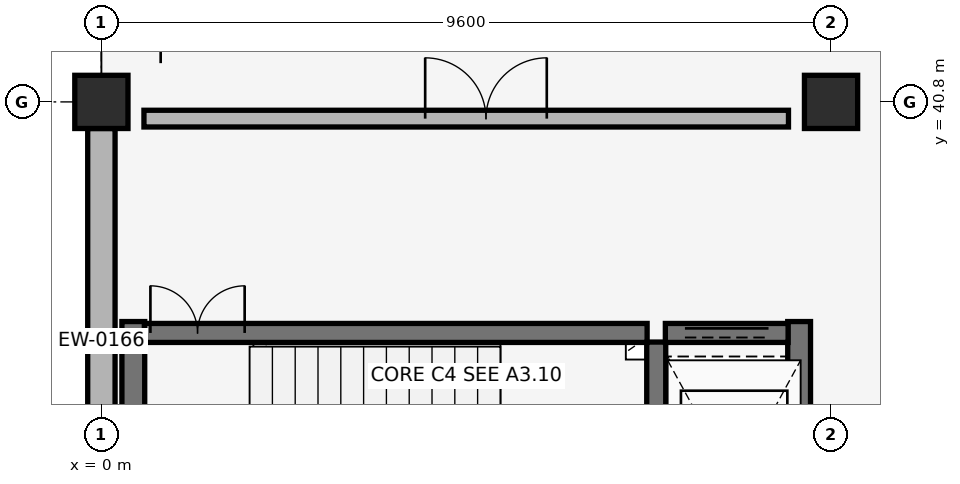
"""IFC4 building model, lengths in metres.
Left out: names, types, materials, properties, quantities, classifications, styles, units other than length and angle.
Written with IfcOpenShell. Run it as: python <this file> out.ifc"""

import sys

from ifc_helpers import new_model, si_unit, direction, frame, frame_2d, origin, origin_2d, place, context, subcontext, project, spatial, rectangle, circle, extrude, element, fill, save


model = new_model("IFC4")
c1 = context("Model", 3, precision=1e-05, world=origin(), true_north=direction((0.0, 1.0)))
c2 = subcontext(c1, "Body", "Model", "MODEL_VIEW")
j1 = project(units=[si_unit("LENGTHUNIT", "METRE"), si_unit("PLANEANGLEUNIT", "RADIAN")], contexts=[c1])
p1 = place(None, origin())
s1 = spatial("IfcSite", under=j1, at=p1, CompositionType="ELEMENT")
p2 = place(p1, origin())
s2 = spatial("IfcBuilding", under=s1, at=p2, CompositionType="ELEMENT")
p3 = place(p2, frame((0.0, 0.0, 4.42)))
s3 = spatial("IfcBuildingStorey", under=s2, at=p3, CompositionType="ELEMENT", Elevation=4.42)
for number, where, z_axis, x_axis in (
    (1, (0.0, 40.8, 0.0), (0.0, 0.0, 1.0), (1.0, 0.0, 0.0)),
    (2, (9.6, 40.8, 0.0), (0.0, 0.0, 1.0), (1.0, 0.0, 0.0)),
):
    element("IfcColumn", number, at=place(p3, frame(where, z_axis=z_axis, x_axis=x_axis)), inside=s3, PredefinedType="COLUMN", context=c2, shape_type="SweptSolid", body=[
        extrude(circle(Radius=0.35, at=origin_2d()), origin(), (0.0, 0.0, 1.0), 4.08),
    ])
p4 = place(p3, frame((0.0, 40.45, 0.0), z_axis=(0.0, 0.0, 1.0), x_axis=(0.0, -1.0, 0.0)))
e3 = element("IfcWall", 3, at=p4, inside=s3, PredefinedType="SOLIDWALL", context=c2, shape_type="SweptSolid", body=[
    extrude(rectangle(XDim=6.5, YDim=0.36, at=frame_2d((3.25, 0.0))), origin(), (0.0, 0.0, 1.0), 3.06),
])
for number, where, z_axis, x_axis in (
    (4, (0.42, 33.81, 0.0), (0.0, 0.0, 1.0), (0.0, 1.0, 0.0)),
    (5, (9.18, 33.81, 0.0), (0.0, 0.0, 1.0), (0.0, 1.0, 0.0)),
):
    element("IfcWall", number, at=place(p3, frame(where, z_axis=z_axis, x_axis=x_axis)), inside=s3, PredefinedType="SHEAR", context=c2, shape_type="SweptSolid", body=[
        extrude(rectangle(XDim=4.1, YDim=0.3, at=frame_2d((2.05, 0.0))), origin(), (0.0, 0.0, 1.0), 3.78),
    ])
p5 = place(p3, frame((7.3, 34.11, 0.0), z_axis=(0.0, 0.0, 1.0), x_axis=(0.0, 1.0, 0.0)))
e6 = element("IfcWall", 6, at=p5, inside=s3, PredefinedType="SHEAR", context=c2, shape_type="SweptSolid", body=[
    extrude(rectangle(XDim=3.53, YDim=0.25, at=frame_2d((1.765, 0.0))), origin(), (0.0, 0.0, 1.0), 3.78),
])
p6 = place(p3, frame((0.565, 37.76, 0.0), z_axis=(0.0, 0.0, 1.0), x_axis=(1.0, 0.0, 0.0)))
e7 = element("IfcWall", 7, at=p6, inside=s3, PredefinedType="SHEAR", context=c2, shape_type="SweptSolid", body=[
    extrude(rectangle(XDim=6.615, YDim=0.25, at=frame_2d((3.308, 0.0))), origin(), (0.0, 0.0, 1.0), 3.78),
])
p7 = place(p6, frame((0.08, 0.0, 0.0)))
e8 = element("IfcOpeningElement", 8, at=p7, cuts=e7, PredefinedType="OPENING", context=c2, shape_type="SweptSolid", body=[
    extrude(rectangle(XDim=1.24, YDim=2.15, at=frame_2d((0.62, 1.075))), frame((0.0, 0.135, 0.0), z_axis=(0.0, -1.0, 0.0), x_axis=(1.0, 0.0, 0.0)), (0.0, 0.0, 1.0), 0.27),
])
p8 = place(p3, frame((0.56, 40.58, 0.0), z_axis=(0.0, 0.0, 1.0), x_axis=(1.0, 0.0, 0.0)))
e9 = element("IfcWall", 9, at=p8, inside=s3, PredefinedType="PARTITIONING", context=c2, shape_type="SweptSolid", body=[
    extrude(rectangle(XDim=8.48, YDim=0.22, at=frame_2d((4.24, 0.0))), origin(), (0.0, 0.0, 1.0), 3.11),
])
p9 = place(p8, frame((3.7, 0.0, 0.0)))
e10 = element("IfcOpeningElement", 10, at=p9, cuts=e9, PredefinedType="OPENING", context=c2, shape_type="SweptSolid", body=[
    extrude(rectangle(XDim=1.6, YDim=2.2, at=frame_2d((0.8, 1.1))), frame((0.0, 0.12, 0.0), z_axis=(0.0, -1.0, 0.0), x_axis=(1.0, 0.0, 0.0)), (0.0, 0.0, 1.0), 0.24),
])
p10 = place(p3, frame((7.42, 37.76, 0.0), z_axis=(0.0, 0.0, 1.0), x_axis=(1.0, 0.0, 0.0)))
e11 = element("IfcWall", 11, at=p10, inside=s3, PredefinedType="SHEAR", context=c2, shape_type="SweptSolid", body=[
    extrude(rectangle(XDim=1.615, YDim=0.25, at=frame_2d((0.808, 0.0))), origin(), (0.0, 0.0, 1.0), 3.78),
])
p11 = place(p10, frame((0.258, 0.0, 0.0)))
e12 = element("IfcOpeningElement", 12, at=p11, cuts=e11, PredefinedType="OPENING", context=c2, shape_type="SweptSolid", body=[
    extrude(rectangle(XDim=1.1, YDim=2.15, at=frame_2d((0.55, 1.075))), frame((0.0, 0.135, 0.0), z_axis=(0.0, -1.0, 0.0), x_axis=(1.0, 0.0, 0.0)), (0.0, 0.0, 1.0), 0.27),
])
p12 = place(p7, origin())
e13 = element("IfcDoor", 13, at=p12, inside=s3, OperationType="DOUBLE_DOOR_SINGLE_SWING", PredefinedType="DOOR", context=c2, shape_type="SweptSolid", body=[
    extrude(rectangle(XDim=1.24, YDim=2.15, at=frame_2d((0.62, 1.075))), frame((0.0, 0.025, 0.0), z_axis=(0.0, -1.0, 0.0), x_axis=(1.0, 0.0, 0.0)), (0.0, 0.0, 1.0), 0.05),
])
fill(e8, e13)
p13 = place(p9, origin())
e14 = element("IfcDoor", 14, at=p13, inside=s3, OperationType="DOUBLE_DOOR_SINGLE_SWING", PredefinedType="DOOR", context=c2, shape_type="SweptSolid", body=[
    extrude(rectangle(XDim=1.6, YDim=2.2, at=frame_2d((0.8, 1.1))), frame((0.0, 0.025, 0.0), z_axis=(0.0, -1.0, 0.0), x_axis=(1.0, 0.0, 0.0)), (0.0, 0.0, 1.0), 0.05),
])
fill(e10, e14)
p14 = place(p11, origin())
e15 = element("IfcDoor", 15, at=p14, inside=s3, OperationType="DOUBLE_DOOR_SLIDING", PredefinedType="DOOR", context=c2, shape_type="SweptSolid", body=[
    extrude(rectangle(XDim=1.1, YDim=2.15, at=frame_2d((0.55, 1.075))), frame((0.0, 0.025, 0.0), z_axis=(0.0, -1.0, 0.0), x_axis=(1.0, 0.0, 0.0)), (0.0, 0.0, 1.0), 0.05),
])
fill(e12, e15)
save(model, sys.argv[1])
